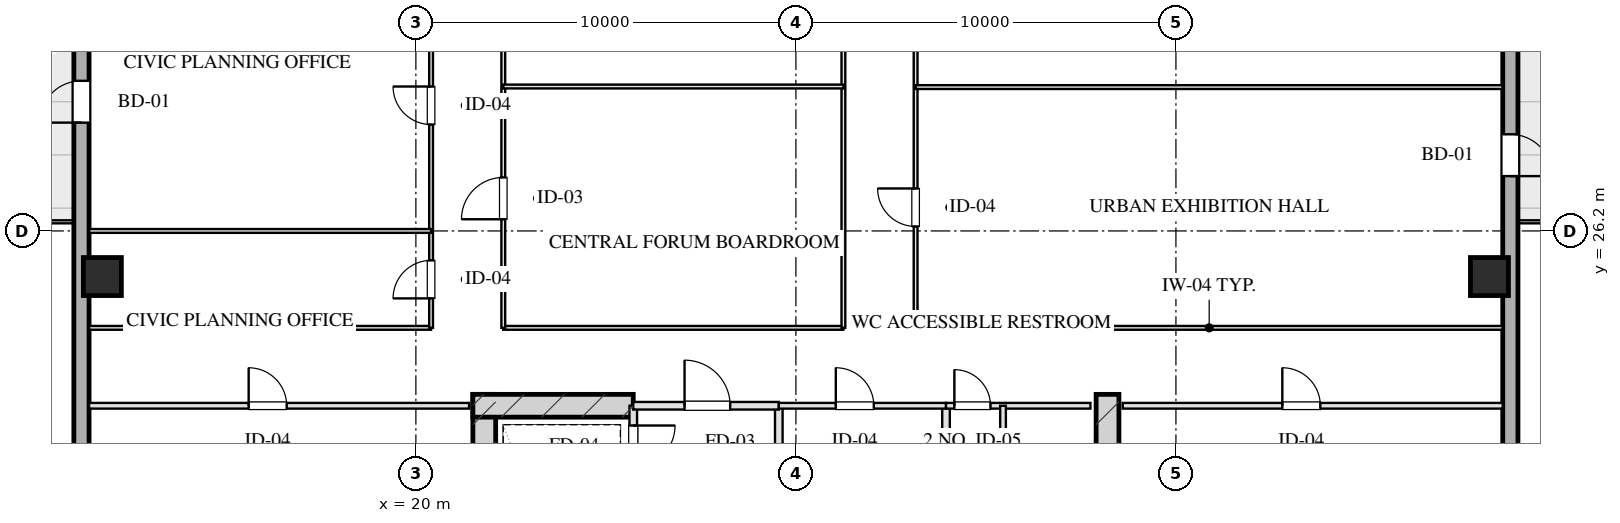
"""IFC4 building model, lengths in metres.
Left out: names, types, materials, properties, quantities, classifications, styles, units other than length and angle.
Written with IfcOpenShell. Run it as: python <this file> out.ifc"""

import sys

from ifc_helpers import new_model, si_unit, direction, frame, frame_2d, origin, origin_2d, place, context, subcontext, project, spatial, rectangle, hollow_rectangle, extrude, element, fill, save


model = new_model("IFC4")
c1 = context("Model", 3, precision=1e-05, world=origin(), true_north=direction((0.0, 1.0)))
c2 = subcontext(c1, "Body", "Model", "MODEL_VIEW")
j1 = project(units=[si_unit("LENGTHUNIT", "METRE"), si_unit("PLANEANGLEUNIT", "RADIAN")], contexts=[c1])
p1 = place(None, origin())
s1 = spatial("IfcSite", under=j1, at=p1, CompositionType="ELEMENT")
p2 = place(p1, origin())
s2 = spatial("IfcBuilding", under=s1, at=p2, CompositionType="ELEMENT")
p3 = place(p2, frame((0.0, 0.0, 146.05)))
s3 = spatial("IfcBuildingStorey", under=s2, at=p3, CompositionType="ELEMENT", Elevation=146.05)
for number, where, z_axis, x_axis in (
    (1, (21.8, 21.9, 0.0), (0.0, 0.0, 1.0), (0.0, -1.0, 0.0)),
    (2, (38.2, 21.9, 0.0), (0.0, 0.0, 1.0), (0.0, -1.0, 0.0)),
):
    element("IfcWall", number, at=place(p3, frame(where, z_axis=z_axis, x_axis=x_axis)), inside=s3, PredefinedType="SHEAR", context=c2, shape_type="SweptSolid", body=[
        extrude(rectangle(XDim=9.48, YDim=0.6, at=frame_2d((4.74, 0.0))), origin(), (0.0, 0.0, 1.0), 3.45),
    ])
p4 = place(p3, frame((21.5, 21.6, 0.0), z_axis=(0.0, 0.0, 1.0), x_axis=(1.0, 0.0, 0.0)))
e3 = element("IfcWall", 3, at=p4, inside=s3, PredefinedType="SHEAR", context=c2, shape_type="SweptSolid", body=[
    extrude(rectangle(XDim=4.22, YDim=0.6, at=frame_2d((2.11, 0.0))), origin(), (0.0, 0.0, 1.0), 3.45),
])
for number, where, z_axis, x_axis in (
    (4, (11.75, 25.0, 0.0), (0.0, 0.0, 1.0), (1.0, 0.0, 0.0)),
    (5, (48.25, 25.0, 0.0), (0.0, 0.0, 1.0), (1.0, 0.0, 0.0)),
):
    element("IfcColumn", number, at=place(p3, frame(where, z_axis=z_axis, x_axis=x_axis)), inside=s3, PredefinedType="COLUMN", context=c2, shape_type="SweptSolid", body=[
        extrude(hollow_rectangle(XDim=1.0, YDim=1.0, WallThickness=0.036, at=origin_2d()), origin(), (0.0, 0.0, 1.0), 3.451),
    ])
p5 = place(p3, frame((11.2, 9.0, 0.0), z_axis=(0.0, 0.0, 1.0), x_axis=(0.0, 1.0, 0.0)))
e6 = element("IfcWall", 6, at=p5, inside=s3, PredefinedType="SOLIDWALL", context=c2, shape_type="SweptSolid", body=[
    extrude(rectangle(XDim=50.0, YDim=0.4, at=frame_2d((25.0, 0.0))), origin(), (0.0, 0.0, 1.0), 2.61),
])
p6 = place(p5, frame((20.05, 0.0, 0.0)))
e7 = element("IfcOpeningElement", 7, at=p6, cuts=e6, PredefinedType="OPENING", context=c2, shape_type="SweptSolid", body=[
    extrude(rectangle(XDim=1.1, YDim=2.15, at=frame_2d((0.55, 1.075))), frame((0.0, 0.21, 0.0), z_axis=(0.0, -1.0, 0.0), x_axis=(1.0, 0.0, 0.0)), (0.0, 0.0, 1.0), 0.42),
])
p7 = place(p3, frame((48.8, 59.0, 0.0), z_axis=(0.0, 0.0, 1.0), x_axis=(0.0, -1.0, 0.0)))
e8 = element("IfcWall", 8, at=p7, inside=s3, PredefinedType="SOLIDWALL", context=c2, shape_type="SweptSolid", body=[
    extrude(rectangle(XDim=50.0, YDim=0.4, at=frame_2d((25.0, 0.0))), origin(), (0.0, 0.0, 1.0), 2.61),
])
p8 = place(p7, frame((17.475, 0.0, 0.75)))
e9 = element("IfcOpeningElement", 9, at=p8, cuts=e8, PredefinedType="OPENING", context=c2, shape_type="SweptSolid", body=[
    extrude(rectangle(XDim=2.25, YDim=1.46, at=frame_2d((1.125, 0.73))), frame((0.0, 0.21, 0.0), z_axis=(0.0, -1.0, 0.0), x_axis=(1.0, 0.0, 0.0)), (0.0, 0.0, 1.0), 0.42),
])
p9 = place(p7, frame((30.258, 0.0, 0.0)))
e10 = element("IfcOpeningElement", 10, at=p9, cuts=e8, PredefinedType="OPENING", context=c2, shape_type="SweptSolid", body=[
    extrude(rectangle(XDim=1.1, YDim=2.15, at=frame_2d((0.55, 1.075))), frame((0.0, 0.21, 0.0), z_axis=(0.0, -1.0, 0.0), x_axis=(1.0, 0.0, 0.0)), (0.0, 0.0, 1.0), 0.42),
])
p10 = place(p3, frame((25.72, 21.6, 0.0), z_axis=(0.0, 0.0, 1.0), x_axis=(0.0, -1.0, 0.0)))
e11 = element("IfcWall", 11, at=p10, inside=s3, PredefinedType="PARTITIONING", context=c2, shape_type="SweptSolid", body=[
    extrude(rectangle(XDim=1.9, YDim=0.2, at=frame_2d((0.95, 0.0))), origin(), (0.0, 0.0, 1.0), 3.175),
])
p11 = place(p10, frame((0.52, 0.0, 0.0)))
e12 = element("IfcOpeningElement", 12, at=p11, cuts=e11, PredefinedType="OPENING", context=c2, shape_type="SweptSolid", body=[
    extrude(rectangle(XDim=1.1, YDim=2.05, at=frame_2d((0.55, 1.025))), frame((0.0, 0.11, 0.0), z_axis=(0.0, -1.0, 0.0), x_axis=(1.0, 0.0, 0.0)), (0.0, 0.0, 1.0), 0.22),
])
p12 = place(p3, frame((29.55, 21.6, 0.0), z_axis=(0.0, 0.0, 1.0), x_axis=(0.0, -1.0, 0.0)))
e13 = element("IfcWall", 13, at=p12, inside=s3, PredefinedType="PARTITIONING", context=c2, shape_type="SweptSolid", body=[
    extrude(rectangle(XDim=8.43, YDim=0.2, at=frame_2d((4.215, 0.0))), origin(), (0.0, 0.0, 1.0), 3.175),
])
p13 = place(p3, frame((25.72, 21.6, 0.0), z_axis=(0.0, 0.0, 1.0), x_axis=(1.0, 0.0, 0.0)))
e14 = element("IfcWall", 14, at=p13, inside=s3, PredefinedType="PARTITIONING", context=c2, shape_type="SweptSolid", body=[
    extrude(rectangle(XDim=3.83, YDim=0.2, at=frame_2d((1.915, 0.0))), origin(), (0.0, 0.0, 1.0), 3.175),
])
p14 = place(p13, frame((1.35, 0.0, 0.0)))
e15 = element("IfcOpeningElement", 15, at=p14, cuts=e14, PredefinedType="OPENING", context=c2, shape_type="SweptSolid", body=[
    extrude(rectangle(XDim=1.2, YDim=2.05, at=frame_2d((0.6, 1.025))), frame((0.0, 0.11, 0.0), z_axis=(0.0, -1.0, 0.0), x_axis=(1.0, 0.0, 0.0)), (0.0, 0.0, 1.0), 0.22),
])
p15 = place(p3, frame((33.95, 21.6, 0.0), z_axis=(0.0, 0.0, 1.0), x_axis=(0.0, -1.0, 0.0)))
e16 = element("IfcWall", 16, at=p15, inside=s3, PredefinedType="PARTITIONING", context=c2, shape_type="SweptSolid", body=[
    extrude(rectangle(XDim=8.43, YDim=0.2, at=frame_2d((4.215, 0.0))), origin(), (0.0, 0.0, 1.0), 3.175),
])
p16 = place(p3, frame((29.55, 21.6, 0.0), z_axis=(0.0, 0.0, 1.0), x_axis=(1.0, 0.0, 0.0)))
e17 = element("IfcWall", 17, at=p16, inside=s3, PredefinedType="PARTITIONING", context=c2, shape_type="SweptSolid", body=[
    extrude(rectangle(XDim=4.4, YDim=0.15, at=frame_2d((2.2, 0.0))), origin(), (0.0, 0.0, 1.0), 3.175),
])
p17 = place(p16, frame((1.5, 0.0, 0.0)))
e18 = element("IfcOpeningElement", 18, at=p17, cuts=e17, PredefinedType="OPENING", context=c2, shape_type="SweptSolid", body=[
    extrude(rectangle(XDim=1.0, YDim=2.05, at=frame_2d((0.5, 1.025))), frame((0.0, 0.085, 0.0), z_axis=(0.0, -1.0, 0.0), x_axis=(1.0, 0.0, 0.0)), (0.0, 0.0, 1.0), 0.17),
])
p18 = place(p3, frame((33.95, 21.6, 0.0), z_axis=(0.0, 0.0, 1.0), x_axis=(1.0, 0.0, 0.0)))
e19 = element("IfcWall", 19, at=p18, inside=s3, PredefinedType="PARTITIONING", context=c2, shape_type="SweptSolid", body=[
    extrude(rectangle(XDim=3.8, YDim=0.15, at=frame_2d((1.9, 0.0))), origin(), (0.0, 0.0, 1.0), 3.175),
])
p19 = place(p18, frame((0.22, 0.0, 0.0)))
e20 = element("IfcOpeningElement", 20, at=p19, cuts=e19, PredefinedType="OPENING", context=c2, shape_type="SweptSolid", body=[
    extrude(rectangle(XDim=0.95, YDim=2.05, at=frame_2d((0.475, 1.025))), frame((0.0, 0.085, 0.0), z_axis=(0.0, -1.0, 0.0), x_axis=(1.0, 0.0, 0.0)), (0.0, 0.0, 1.0), 0.17),
])
p20 = place(p3, frame((35.45, 21.6, 0.0), z_axis=(0.0, 0.0, 1.0), x_axis=(0.0, -1.0, 0.0)))
e21 = element("IfcWall", 21, at=p20, inside=s3, PredefinedType="PARTITIONING", context=c2, shape_type="SweptSolid", body=[
    extrude(rectangle(XDim=8.43, YDim=0.15, at=frame_2d((4.215, 0.0))), origin(), (0.0, 0.0, 1.0), 2.765),
])
p21 = place(p20, frame((2.55, 0.0, 0.0)))
e22 = element("IfcOpeningElement", 22, at=p21, cuts=e21, PredefinedType="OPENING", context=c2, shape_type="SweptSolid", body=[
    extrude(rectangle(XDim=0.95, YDim=2.05, at=frame_2d((0.475, 1.025))), frame((0.0, 0.085, 0.0), z_axis=(0.0, -1.0, 0.0), x_axis=(1.0, 0.0, 0.0)), (0.0, 0.0, 1.0), 0.17),
])
p22 = place(p20, frame((5.8, 0.0, 0.0)))
e23 = element("IfcOpeningElement", 23, at=p22, cuts=e21, PredefinedType="OPENING", context=c2, shape_type="SweptSolid", body=[
    extrude(rectangle(XDim=0.9, YDim=2.05, at=frame_2d((0.45, 1.025))), frame((0.0, 0.085, 0.0), z_axis=(0.0, -1.0, 0.0), x_axis=(1.0, 0.0, 0.0)), (0.0, 0.0, 1.0), 0.17),
])
p23 = place(p3, frame((11.4, 21.6, 0.0), z_axis=(0.0, 0.0, 1.0), x_axis=(1.0, 0.0, 0.0)))
e24 = element("IfcWall", 24, at=p23, inside=s3, PredefinedType="PARTITIONING", context=c2, shape_type="SweptSolid", body=[
    extrude(rectangle(XDim=10.0, YDim=0.15, at=frame_2d((5.0, 0.0))), origin(), (0.0, 0.0, 1.0), 3.175),
])
p24 = place(p23, frame((4.2, 0.0, 0.0)))
e25 = element("IfcOpeningElement", 25, at=p24, cuts=e24, PredefinedType="OPENING", context=c2, shape_type="SweptSolid", body=[
    extrude(rectangle(XDim=1.0, YDim=2.05, at=frame_2d((0.5, 1.025))), frame((0.0, 0.085, 0.0), z_axis=(0.0, -1.0, 0.0), x_axis=(1.0, 0.0, 0.0)), (0.0, 0.0, 1.0), 0.17),
])
p25 = place(p3, frame((38.6, 21.6, 0.0), z_axis=(0.0, 0.0, 1.0), x_axis=(1.0, 0.0, 0.0)))
e26 = element("IfcWall", 26, at=p25, inside=s3, PredefinedType="PARTITIONING", context=c2, shape_type="SweptSolid", body=[
    extrude(rectangle(XDim=10.0, YDim=0.15, at=frame_2d((5.0, 0.0))), origin(), (0.0, 0.0, 1.0), 3.175),
])
p26 = place(p25, frame((4.2, 0.0, 0.0)))
e27 = element("IfcOpeningElement", 27, at=p26, cuts=e26, PredefinedType="OPENING", context=c2, shape_type="SweptSolid", body=[
    extrude(rectangle(XDim=1.0, YDim=2.05, at=frame_2d((0.5, 1.025))), frame((0.0, 0.085, 0.0), z_axis=(0.0, -1.0, 0.0), x_axis=(1.0, 0.0, 0.0)), (0.0, 0.0, 1.0), 0.17),
])
p27 = place(p3, frame((11.4, 23.65, 0.0), z_axis=(0.0, 0.0, 1.0), x_axis=(1.0, 0.0, 0.0)))
e28 = element("IfcWall", 28, at=p27, inside=s3, PredefinedType="MOVABLE", context=c2, shape_type="SweptSolid", body=[
    extrude(rectangle(XDim=9.0, YDim=0.1, at=frame_2d((4.5, 0.0))), origin(), (0.0, 0.0, 1.0), 3.175),
])
p28 = place(p3, frame((22.3, 23.65, 0.0), z_axis=(0.0, 0.0, 1.0), x_axis=(1.0, 0.0, 0.0)))
e29 = element("IfcWall", 29, at=p28, inside=s3, PredefinedType="MOVABLE", context=c2, shape_type="SweptSolid", body=[
    extrude(rectangle(XDim=8.95, YDim=0.1, at=frame_2d((4.475, 0.0))), origin(), (0.0, 0.0, 1.0), 3.175),
])
p29 = place(p3, frame((33.15, 23.65, 0.0), z_axis=(0.0, 0.0, 1.0), x_axis=(1.0, 0.0, 0.0)))
e30 = element("IfcWall", 30, at=p29, inside=s3, PredefinedType="MOVABLE", context=c2, shape_type="SweptSolid", body=[
    extrude(rectangle(XDim=15.45, YDim=0.1, at=frame_2d((7.725, 0.0))), origin(), (0.0, 0.0, 1.0), 3.175),
])
p30 = place(p3, frame((20.4, 23.65, 0.0), z_axis=(0.0, 0.0, 1.0), x_axis=(0.0, 1.0, 0.0)))
e31 = element("IfcWall", 31, at=p30, inside=s3, PredefinedType="MOVABLE", context=c2, shape_type="SweptSolid", body=[
    extrude(rectangle(XDim=20.7, YDim=0.1, at=frame_2d((10.35, 0.0))), origin(), (0.0, 0.0, 1.0), 3.175),
])
p31 = place(p30, frame((0.775, 0.0, 0.0)))
e32 = element("IfcOpeningElement", 32, at=p31, cuts=e31, PredefinedType="OPENING", context=c2, shape_type="SweptSolid", body=[
    extrude(rectangle(XDim=1.0, YDim=2.05, at=frame_2d((0.5, 1.025))), frame((0.0, 0.06, 0.0), z_axis=(0.0, -1.0, 0.0), x_axis=(1.0, 0.0, 0.0)), (0.0, 0.0, 1.0), 0.12),
])
p32 = place(p30, frame((5.35, 0.0, 0.0)))
e33 = element("IfcOpeningElement", 33, at=p32, cuts=e31, PredefinedType="OPENING", context=c2, shape_type="SweptSolid", body=[
    extrude(rectangle(XDim=1.0, YDim=2.05, at=frame_2d((0.5, 1.025))), frame((0.0, 0.06, 0.0), z_axis=(0.0, -1.0, 0.0), x_axis=(1.0, 0.0, 0.0)), (0.0, 0.0, 1.0), 0.12),
])
p33 = place(p30, frame((9.85, 0.0, 0.0)))
e34 = element("IfcOpeningElement", 34, at=p33, cuts=e31, PredefinedType="OPENING", context=c2, shape_type="SweptSolid", body=[
    extrude(rectangle(XDim=1.0, YDim=2.05, at=frame_2d((0.5, 1.025))), frame((0.0, 0.06, 0.0), z_axis=(0.0, -1.0, 0.0), x_axis=(1.0, 0.0, 0.0)), (0.0, 0.0, 1.0), 0.12),
])
p34 = place(p30, frame((14.35, 0.0, 0.0)))
e35 = element("IfcOpeningElement", 35, at=p34, cuts=e31, PredefinedType="OPENING", context=c2, shape_type="SweptSolid", body=[
    extrude(rectangle(XDim=1.0, YDim=2.05, at=frame_2d((0.5, 1.025))), frame((0.0, 0.06, 0.0), z_axis=(0.0, -1.0, 0.0), x_axis=(1.0, 0.0, 0.0)), (0.0, 0.0, 1.0), 0.12),
])
p35 = place(p30, frame((18.925, 0.0, 0.0)))
e36 = element("IfcOpeningElement", 36, at=p35, cuts=e31, PredefinedType="OPENING", context=c2, shape_type="SweptSolid", body=[
    extrude(rectangle(XDim=1.0, YDim=2.05, at=frame_2d((0.5, 1.025))), frame((0.0, 0.06, 0.0), z_axis=(0.0, -1.0, 0.0), x_axis=(1.0, 0.0, 0.0)), (0.0, 0.0, 1.0), 0.12),
])
p36 = place(p3, frame((22.3, 23.65, 0.0), z_axis=(0.0, 0.0, 1.0), x_axis=(0.0, 1.0, 0.0)))
e37 = element("IfcWall", 37, at=p36, inside=s3, PredefinedType="MOVABLE", context=c2, shape_type="SweptSolid", body=[
    extrude(rectangle(XDim=20.7, YDim=0.1, at=frame_2d((10.35, 0.0))), origin(), (0.0, 0.0, 1.0), 3.175),
])
p37 = place(p36, frame((2.857, 0.0, 0.0)))
e38 = element("IfcOpeningElement", 38, at=p37, cuts=e37, PredefinedType="OPENING", context=c2, shape_type="SweptSolid", body=[
    extrude(rectangle(XDim=1.1, YDim=2.05, at=frame_2d((0.55, 1.025))), frame((0.0, 0.06, 0.0), z_axis=(0.0, -1.0, 0.0), x_axis=(1.0, 0.0, 0.0)), (0.0, 0.0, 1.0), 0.12),
])
p38 = place(p36, frame((17.208, 0.0, 0.0)))
e39 = element("IfcOpeningElement", 39, at=p38, cuts=e37, PredefinedType="OPENING", context=c2, shape_type="SweptSolid", body=[
    extrude(rectangle(XDim=1.1, YDim=2.05, at=frame_2d((0.55, 1.025))), frame((0.0, 0.06, 0.0), z_axis=(0.0, -1.0, 0.0), x_axis=(1.0, 0.0, 0.0)), (0.0, 0.0, 1.0), 0.12),
])
p39 = place(p3, frame((31.25, 23.65, 0.0), z_axis=(0.0, 0.0, 1.0), x_axis=(0.0, 1.0, 0.0)))
e40 = element("IfcWall", 40, at=p39, inside=s3, PredefinedType="MOVABLE", context=c2, shape_type="SweptSolid", body=[
    extrude(rectangle(XDim=20.7, YDim=0.1, at=frame_2d((10.35, 0.0))), origin(), (0.0, 0.0, 1.0), 3.175),
])
p40 = place(p39, frame((9.71, 0.0, 0.0)))
e41 = element("IfcOpeningElement", 41, at=p40, cuts=e40, PredefinedType="OPENING", context=c2, shape_type="SweptSolid", body=[
    extrude(rectangle(XDim=1.1, YDim=2.05, at=frame_2d((0.55, 1.025))), frame((0.0, 0.06, 0.0), z_axis=(0.0, -1.0, 0.0), x_axis=(1.0, 0.0, 0.0)), (0.0, 0.0, 1.0), 0.12),
])
p41 = place(p3, frame((33.15, 23.65, 0.0), z_axis=(0.0, 0.0, 1.0), x_axis=(0.0, 1.0, 0.0)))
e42 = element("IfcWall", 42, at=p41, inside=s3, PredefinedType="MOVABLE", context=c2, shape_type="SweptSolid", body=[
    extrude(rectangle(XDim=20.7, YDim=0.1, at=frame_2d((10.35, 0.0))), origin(), (0.0, 0.0, 1.0), 3.175),
])
p42 = place(p41, frame((2.667, 0.0, 0.0)))
e43 = element("IfcOpeningElement", 43, at=p42, cuts=e42, PredefinedType="OPENING", context=c2, shape_type="SweptSolid", body=[
    extrude(rectangle(XDim=1.0, YDim=2.05, at=frame_2d((0.5, 1.025))), frame((0.0, 0.06, 0.0), z_axis=(0.0, -1.0, 0.0), x_axis=(1.0, 0.0, 0.0)), (0.0, 0.0, 1.0), 0.12),
])
p43 = place(p41, frame((9.843, 0.0, 0.0)))
e44 = element("IfcOpeningElement", 44, at=p43, cuts=e42, PredefinedType="OPENING", context=c2, shape_type="SweptSolid", body=[
    extrude(rectangle(XDim=1.0, YDim=2.05, at=frame_2d((0.5, 1.025))), frame((0.0, 0.06, 0.0), z_axis=(0.0, -1.0, 0.0), x_axis=(1.0, 0.0, 0.0)), (0.0, 0.0, 1.0), 0.12),
])
p44 = place(p41, frame((17.025, 0.0, 0.0)))
e45 = element("IfcOpeningElement", 45, at=p44, cuts=e42, PredefinedType="OPENING", context=c2, shape_type="SweptSolid", body=[
    extrude(rectangle(XDim=0.85, YDim=2.05, at=frame_2d((0.425, 1.025))), frame((0.0, 0.06, 0.0), z_axis=(0.0, -1.0, 0.0), x_axis=(1.0, 0.0, 0.0)), (0.0, 0.0, 1.0), 0.12),
])
p45 = place(p3, frame((22.3, 30.0, 0.0), z_axis=(0.0, 0.0, 1.0), x_axis=(1.0, 0.0, 0.0)))
e46 = element("IfcWall", 46, at=p45, inside=s3, PredefinedType="MOVABLE", context=c2, shape_type="SweptSolid", body=[
    extrude(rectangle(XDim=8.95, YDim=0.1, at=frame_2d((4.475, 0.0))), origin(), (0.0, 0.0, 1.0), 3.175),
])
p46 = place(p3, frame((11.4, 26.2, 0.0), z_axis=(0.0, 0.0, 1.0), x_axis=(1.0, 0.0, 0.0)))
e47 = element("IfcWall", 47, at=p46, inside=s3, PredefinedType="MOVABLE", context=c2, shape_type="SweptSolid", body=[
    extrude(rectangle(XDim=9.0, YDim=0.1, at=frame_2d((4.5, 0.0))), origin(), (0.0, 0.0, 1.0), 3.175),
])
p47 = place(p3, frame((33.15, 29.985, 0.0), z_axis=(0.0, 0.0, 1.0), x_axis=(1.0, 0.0, 0.0)))
e48 = element("IfcWall", 48, at=p47, inside=s3, PredefinedType="MOVABLE", context=c2, shape_type="SweptSolid", body=[
    extrude(rectangle(XDim=15.45, YDim=0.1, at=frame_2d((7.725, 0.0))), origin(), (0.0, 0.0, 1.0), 3.175),
])
p48 = place(p6, origin())
e49 = element("IfcDoor", 49, at=p48, inside=s3, OperationType="SINGLE_SWING_LEFT", PredefinedType="DOOR", context=c2, shape_type="SweptSolid", body=[
    extrude(rectangle(XDim=1.1, YDim=2.15, at=frame_2d((0.55, 1.075))), frame((0.0, 0.025, 0.0), z_axis=(0.0, -1.0, 0.0), x_axis=(1.0, 0.0, 0.0)), (0.0, 0.0, 1.0), 0.05),
])
fill(e7, e49)
p49 = place(p9, origin())
e50 = element("IfcDoor", 50, at=p49, inside=s3, OperationType="SINGLE_SWING_RIGHT", PredefinedType="DOOR", context=c2, shape_type="SweptSolid", body=[
    extrude(rectangle(XDim=1.1, YDim=2.15, at=frame_2d((0.55, 1.075))), frame((0.0, 0.025, 0.0), z_axis=(0.0, -1.0, 0.0), x_axis=(1.0, 0.0, 0.0)), (0.0, 0.0, 1.0), 0.05),
])
fill(e10, e50)
p50 = place(p11, origin())
e51 = element("IfcDoor", 51, at=p50, inside=s3, OperationType="SINGLE_SWING_LEFT", PredefinedType="DOOR", context=c2, shape_type="SweptSolid", body=[
    extrude(rectangle(XDim=1.1, YDim=2.05, at=frame_2d((0.55, 1.025))), frame((0.0, 0.025, 0.0), z_axis=(0.0, -1.0, 0.0), x_axis=(1.0, 0.0, 0.0)), (0.0, 0.0, 1.0), 0.05),
])
fill(e12, e51)
p51 = place(p14, origin())
e52 = element("IfcDoor", 52, at=p51, inside=s3, OperationType="SINGLE_SWING_LEFT", PredefinedType="DOOR", context=c2, shape_type="SweptSolid", body=[
    extrude(rectangle(XDim=1.2, YDim=2.05, at=frame_2d((0.6, 1.025))), frame((0.0, 0.025, 0.0), z_axis=(0.0, -1.0, 0.0), x_axis=(1.0, 0.0, 0.0)), (0.0, 0.0, 1.0), 0.05),
])
fill(e15, e52)
p52 = place(p17, origin())
e53 = element("IfcDoor", 53, at=p52, inside=s3, OperationType="SINGLE_SWING_LEFT", PredefinedType="DOOR", context=c2, shape_type="SweptSolid", body=[
    extrude(rectangle(XDim=1.0, YDim=2.05, at=frame_2d((0.5, 1.025))), frame((0.0, 0.025, 0.0), z_axis=(0.0, -1.0, 0.0), x_axis=(1.0, 0.0, 0.0)), (0.0, 0.0, 1.0), 0.05),
])
fill(e18, e53)
p53 = place(p19, origin())
e54 = element("IfcDoor", 54, at=p53, inside=s3, OperationType="SINGLE_SWING_LEFT", PredefinedType="DOOR", context=c2, shape_type="SweptSolid", body=[
    extrude(rectangle(XDim=0.95, YDim=2.05, at=frame_2d((0.475, 1.025))), frame((0.0, 0.025, 0.0), z_axis=(0.0, -1.0, 0.0), x_axis=(1.0, 0.0, 0.0)), (0.0, 0.0, 1.0), 0.05),
])
fill(e20, e54)
p54 = place(p24, origin())
e55 = element("IfcDoor", 55, at=p54, inside=s3, OperationType="SINGLE_SWING_LEFT", PredefinedType="DOOR", context=c2, shape_type="SweptSolid", body=[
    extrude(rectangle(XDim=1.0, YDim=2.05, at=frame_2d((0.5, 1.025))), frame((0.0, 0.025, 0.0), z_axis=(0.0, -1.0, 0.0), x_axis=(1.0, 0.0, 0.0)), (0.0, 0.0, 1.0), 0.05),
])
fill(e25, e55)
p55 = place(p26, origin())
e56 = element("IfcDoor", 56, at=p55, inside=s3, OperationType="SINGLE_SWING_LEFT", PredefinedType="DOOR", context=c2, shape_type="SweptSolid", body=[
    extrude(rectangle(XDim=1.0, YDim=2.05, at=frame_2d((0.5, 1.025))), frame((0.0, 0.025, 0.0), z_axis=(0.0, -1.0, 0.0), x_axis=(1.0, 0.0, 0.0)), (0.0, 0.0, 1.0), 0.05),
])
fill(e27, e56)
p56 = place(p31, origin())
e57 = element("IfcDoor", 57, at=p56, inside=s3, OperationType="SINGLE_SWING_LEFT", PredefinedType="DOOR", context=c2, shape_type="SweptSolid", body=[
    extrude(rectangle(XDim=1.0, YDim=2.05, at=frame_2d((0.5, 1.025))), frame((0.0, 0.025, 0.0), z_axis=(0.0, -1.0, 0.0), x_axis=(1.0, 0.0, 0.0)), (0.0, 0.0, 1.0), 0.05),
])
fill(e32, e57)
p57 = place(p32, origin())
e58 = element("IfcDoor", 58, at=p57, inside=s3, OperationType="SINGLE_SWING_RIGHT", PredefinedType="DOOR", context=c2, shape_type="SweptSolid", body=[
    extrude(rectangle(XDim=1.0, YDim=2.05, at=frame_2d((0.5, 1.025))), frame((0.0, 0.025, 0.0), z_axis=(0.0, -1.0, 0.0), x_axis=(1.0, 0.0, 0.0)), (0.0, 0.0, 1.0), 0.05),
])
fill(e33, e58)
p58 = place(p37, origin())
e59 = element("IfcDoor", 59, at=p58, inside=s3, OperationType="SINGLE_SWING_LEFT", PredefinedType="DOOR", context=c2, shape_type="SweptSolid", body=[
    extrude(rectangle(XDim=1.1, YDim=2.05, at=frame_2d((0.55, 1.025))), frame((0.0, 0.025, 0.0), z_axis=(0.0, -1.0, 0.0), x_axis=(1.0, 0.0, 0.0)), (0.0, 0.0, 1.0), 0.05),
])
fill(e38, e59)
p59 = place(p42, origin())
e60 = element("IfcDoor", 60, at=p59, inside=s3, OperationType="SINGLE_SWING_RIGHT", PredefinedType="DOOR", context=c2, shape_type="SweptSolid", body=[
    extrude(rectangle(XDim=1.0, YDim=2.05, at=frame_2d((0.5, 1.025))), frame((0.0, 0.025, 0.0), z_axis=(0.0, -1.0, 0.0), x_axis=(1.0, 0.0, 0.0)), (0.0, 0.0, 1.0), 0.05),
])
fill(e43, e60)
save(model, sys.argv[1])
